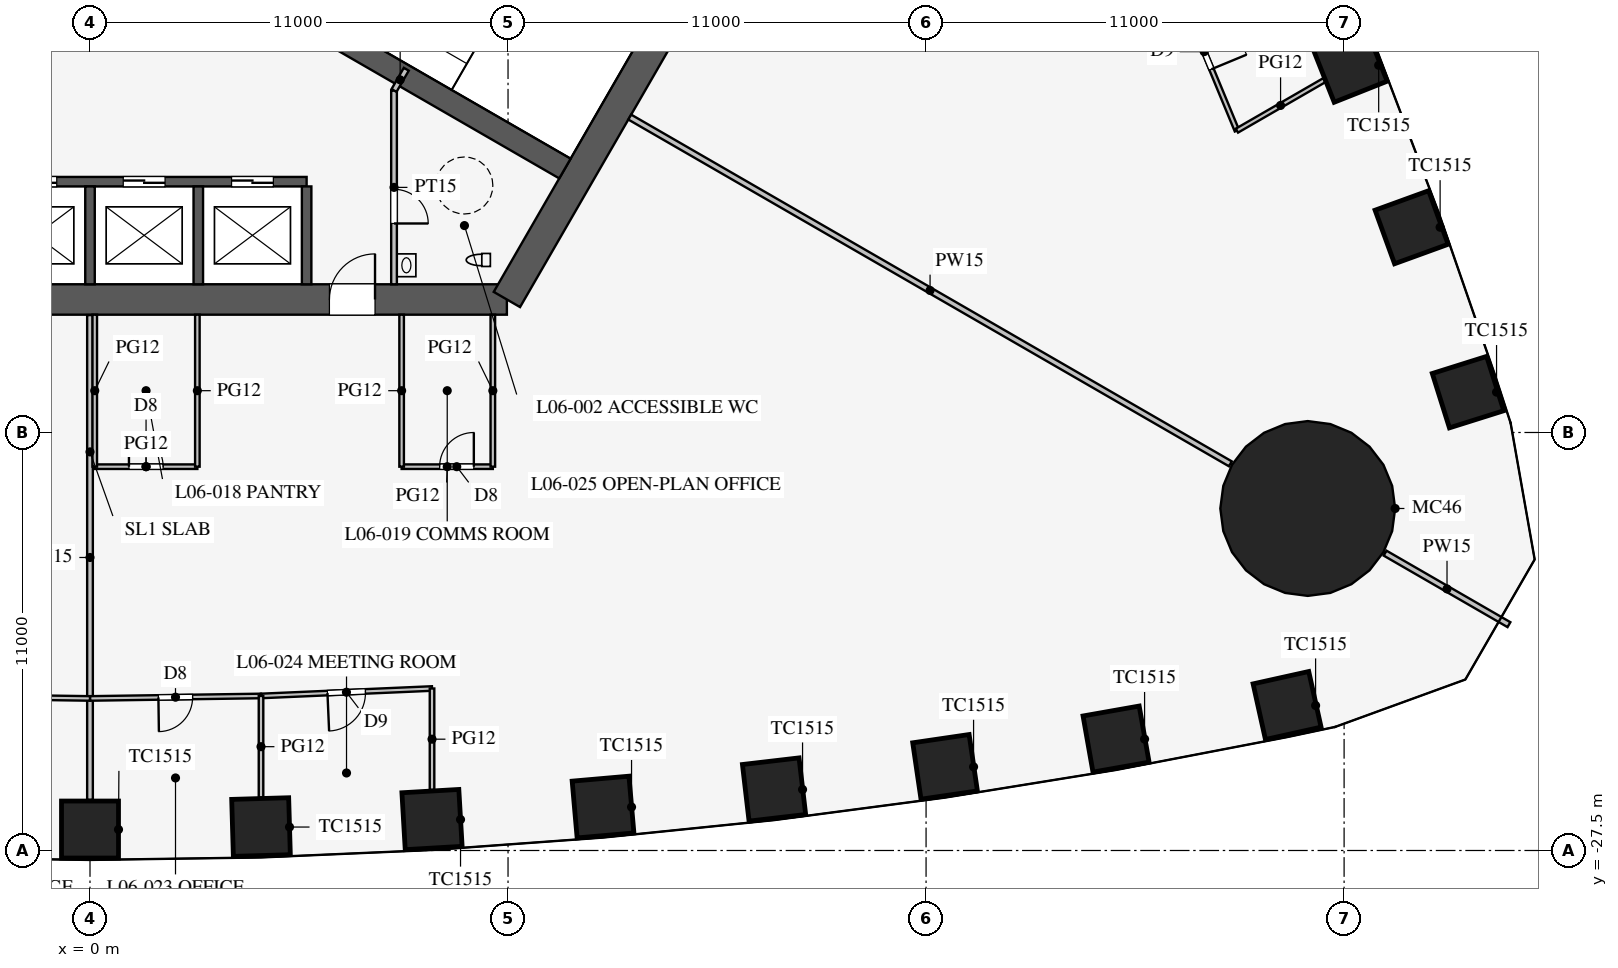
"""IFC4 building model, lengths in metres.
Left out: names, types, materials, properties, quantities, classifications, styles, units other than length and angle.
Written with IfcOpenShell. Run it as: python <this file> out.ifc"""

import sys

from ifc_helpers import new_model, si_unit, direction, frame, frame_2d, origin, origin_2d, place, context, subcontext, project, spatial, rectangle, circle, extrude, element, fill, save


model = new_model("IFC4")
c1 = context("Model", 3, precision=1e-05, world=origin(), true_north=direction((0.0, 1.0)))
c2 = subcontext(c1, "Body", "Model", "MODEL_VIEW")
j1 = project(units=[si_unit("LENGTHUNIT", "METRE"), si_unit("PLANEANGLEUNIT", "RADIAN")], contexts=[c1])
p1 = place(None, origin())
s1 = spatial("IfcSite", under=j1, at=p1, CompositionType="ELEMENT")
p2 = place(p1, origin())
s2 = spatial("IfcBuilding", under=s1, at=p2, CompositionType="ELEMENT")
p3 = place(p2, frame((0.0, 0.0, 29.1)))
s3 = spatial("IfcBuildingStorey", under=s2, at=p3, CompositionType="ELEMENT", Elevation=29.1)
for number, where, z_axis, x_axis in (
    (1, (0.0, -26.949, 0.0), (0.0, 0.0, 1.0), (1.0, 0.0, 0.0)),
    (2, (4.5, -26.883, 0.0), (0.0, 0.0, 1.0), (1.0, 0.029, 0.0)),
    (3, (9.0, -26.686, 0.0), (0.0, 0.0, 1.0), (0.998, 0.058, 0.0)),
    (4, (13.5, -26.357, 0.0), (0.0, 0.0, 1.0), (0.996, 0.087, 0.0)),
    (5, (18.0, -25.895, 0.0), (0.0, 0.0, 1.0), (0.993, 0.116, 0.0)),
    (6, (22.5, -25.299, 0.0), (0.0, 0.0, 1.0), (0.989, 0.145, 0.0)),
    (7, (27.0, -24.568, 0.0), (0.0, 0.0, 1.0), (0.985, 0.174, 0.0)),
    (8, (31.5, -23.685, 0.0), (0.0, 0.0, 1.0), (0.976, 0.217, 0.0)),
    (9, (36.262, -15.438, 0.0), (0.0, 0.0, 1.0), (-0.3, 0.954, 0.0)),
    (10, (34.776, -11.099, 0.0), (0.0, 0.0, 1.0), (-0.342, 0.94, 0.0)),
    (11, (33.16, -6.836, 0.0), (0.0, 0.0, 1.0), (-0.369, 0.929, 0.0)),
):
    element("IfcColumn", number, at=place(p3, frame(where, z_axis=z_axis, x_axis=x_axis)), inside=s3, PredefinedType="COLUMN", context=c2, shape_type="SweptSolid", body=[
        extrude(rectangle(XDim=1.5, YDim=1.5, at=origin_2d()), origin(), (0.0, 0.0, 1.0), 4.2),
    ])
p4 = place(p3, frame((32.043, -18.5, 0.0), z_axis=(0.0, 0.0, 1.0), x_axis=(1.0, 0.0, 0.0)))
e12 = element("IfcColumn", 12, at=p4, inside=s3, PredefinedType="COLUMN", context=c2, shape_type="SweptSolid", body=[
    extrude(circle(Radius=2.3, at=origin_2d()), origin(), (0.0, 0.0, 1.0), 4.2),
])
p5 = place(p3, frame((-10.97, -13.0, 0.0), z_axis=(0.0, 0.0, 1.0), x_axis=(1.0, 0.0, 0.0)))
e13 = element("IfcWall", 13, at=p5, inside=s3, PredefinedType="SHEAR", context=c2, shape_type="SweptSolid", body=[
    extrude(rectangle(XDim=21.939, YDim=0.8, at=frame_2d((10.97, 0.0))), origin(), (0.0, 0.0, 1.0), 4.2),
])
p6 = place(p5, frame((17.27, 0.0, 0.0)))
e14 = element("IfcOpeningElement", 14, at=p6, cuts=e13, PredefinedType="OPENING", context=c2, shape_type="SweptSolid", body=[
    extrude(rectangle(XDim=1.2, YDim=2.1, at=frame_2d((0.6, 1.05))), frame((0.0, 0.41, 0.0), z_axis=(0.0, -1.0, 0.0), x_axis=(1.0, 0.0, 0.0)), (0.0, 0.0, 1.0), 0.82),
])
p7 = place(p5, frame((3.47, 0.0, 0.0)))
e15 = element("IfcOpeningElement", 15, at=p7, cuts=e13, PredefinedType="OPENING", context=c2, shape_type="SweptSolid", body=[
    extrude(rectangle(XDim=1.2, YDim=2.1, at=frame_2d((0.6, 1.05))), frame((0.0, 0.41, 0.0), z_axis=(0.0, -1.0, 0.0), x_axis=(1.0, 0.0, 0.0)), (0.0, 0.0, 1.0), 0.82),
])
p8 = place(p3, frame((10.97, -13.0, 0.0), z_axis=(0.0, 0.0, 1.0), x_axis=(0.499995765644, 0.866027848477, 0.0)))
e16 = element("IfcWall", 16, at=p8, inside=s3, PredefinedType="SHEAR", context=c2, shape_type="SweptSolid", body=[
    extrude(rectangle(XDim=11.547, YDim=0.8, at=frame_2d((5.773, 0.0))), origin(), (0.0, 0.0, 1.0), 4.2),
])
p9 = place(p3, frame((-5.7, -9.9, 0.0), z_axis=(0.0, 0.0, 1.0), x_axis=(1.0, 0.0, 0.0)))
e17 = element("IfcWall", 17, at=p9, inside=s3, PredefinedType="SHEAR", context=c2, shape_type="SweptSolid", body=[
    extrude(rectangle(XDim=11.4, YDim=0.25, at=frame_2d((5.7, 0.0))), origin(), (0.0, 0.0, 1.0), 4.2),
])
p10 = place(p9, frame((0.875, 0.0, 0.0)))
e18 = element("IfcOpeningElement", 18, at=p10, cuts=e17, PredefinedType="OPENING", context=c2, shape_type="SweptSolid", body=[
    extrude(rectangle(XDim=1.1, YDim=2.2, at=frame_2d((0.55, 1.1))), frame((0.0, 0.135, 0.0), z_axis=(0.0, -1.0, 0.0), x_axis=(1.0, 0.0, 0.0)), (0.0, 0.0, 1.0), 0.27),
])
p11 = place(p9, frame((3.725, 0.0, 0.0)))
e19 = element("IfcOpeningElement", 19, at=p11, cuts=e17, PredefinedType="OPENING", context=c2, shape_type="SweptSolid", body=[
    extrude(rectangle(XDim=1.1, YDim=2.2, at=frame_2d((0.55, 1.1))), frame((0.0, 0.135, 0.0), z_axis=(0.0, -1.0, 0.0), x_axis=(1.0, 0.0, 0.0)), (0.0, 0.0, 1.0), 0.27),
])
p12 = place(p9, frame((6.575, 0.0, 0.0)))
e20 = element("IfcOpeningElement", 20, at=p12, cuts=e17, PredefinedType="OPENING", context=c2, shape_type="SweptSolid", body=[
    extrude(rectangle(XDim=1.1, YDim=2.2, at=frame_2d((0.55, 1.1))), frame((0.0, 0.135, 0.0), z_axis=(0.0, -1.0, 0.0), x_axis=(1.0, 0.0, 0.0)), (0.0, 0.0, 1.0), 0.27),
])
p13 = place(p9, frame((9.425, 0.0, 0.0)))
e21 = element("IfcOpeningElement", 21, at=p13, cuts=e17, PredefinedType="OPENING", context=c2, shape_type="SweptSolid", body=[
    extrude(rectangle(XDim=1.1, YDim=2.2, at=frame_2d((0.55, 1.1))), frame((0.0, 0.135, 0.0), z_axis=(0.0, -1.0, 0.0), x_axis=(1.0, 0.0, 0.0)), (0.0, 0.0, 1.0), 0.27),
])
for number, where, z_axis, x_axis in (
    (22, (0.0, -10.025, 0.0), (0.0, 0.0, 1.0), (0.0, -1.0, 0.0)),
    (23, (2.85, -10.025, 0.0), (0.0, 0.0, 1.0), (0.0, -1.0, 0.0)),
    (24, (5.7, -10.025, 0.0), (0.0, 0.0, 1.0), (0.0, -1.0, 0.0)),
):
    element("IfcWall", number, at=place(p3, frame(where, z_axis=z_axis, x_axis=x_axis)), inside=s3, PredefinedType="SHEAR", context=c2, shape_type="SweptSolid", body=[
        extrude(rectangle(XDim=2.575, YDim=0.25, at=frame_2d((1.288, 0.0))), origin(), (0.0, 0.0, 1.0), 4.2),
    ])
p14 = place(p3, frame((4.638, -5.016, 0.0), z_axis=(0.0, 0.0, 1.0), x_axis=(0.866019375473, -0.500010441196, 0.0)))
e25 = element("IfcWall", 25, at=p14, inside=s3, PredefinedType="SHEAR", context=c2, shape_type="SweptSolid", body=[
    extrude(rectangle(XDim=9.075, YDim=0.6, at=frame_2d((4.538, 0.0))), origin(), (0.0, 0.0, 1.0), 4.2),
])
p15 = place(p3, frame((8.0, -7.5, 0.0), z_axis=(0.0, 0.0, 1.0), x_axis=(0.0, -1.0, 0.0)))
e26 = element("IfcWall", 26, at=p15, inside=s3, PredefinedType="PARTITIONING", context=c2, shape_type="SweptSolid", body=[
    extrude(rectangle(XDim=5.1, YDim=0.15, at=frame_2d((2.55, 0.0))), origin(), (0.0, 0.0, 1.0), 4.0),
])
p16 = place(p15, frame((2.6, 0.0, 0.0)))
e27 = element("IfcOpeningElement", 27, at=p16, cuts=e26, PredefinedType="OPENING", context=c2, shape_type="SweptSolid", body=[
    extrude(rectangle(XDim=0.9, YDim=2.1, at=frame_2d((0.45, 1.05))), frame((0.0, 0.085, 0.0), z_axis=(0.0, -1.0, 0.0), x_axis=(1.0, 0.0, 0.0)), (0.0, 0.0, 1.0), 0.17),
])
p17 = place(p3, frame((8.0, -7.5, 0.0), z_axis=(0.0, 0.0, 1.0), x_axis=(0.499842556608, 0.866116284689, 0.0)))
e28 = element("IfcWall", 28, at=p17, inside=s3, PredefinedType="PARTITIONING", context=c2, shape_type="SweptSolid", body=[
    extrude(rectangle(XDim=0.645, YDim=0.15, at=frame_2d((0.323, 0.0))), origin(), (0.0, 0.0, 1.0), 4.0),
])
p18 = place(p3, frame((14.203, -8.2, 0.0), z_axis=(0.0, 0.0, 1.0), x_axis=(0.866024965723, -0.500000758745, 0.0)))
e29 = element("IfcWall", 29, at=p18, inside=s3, PredefinedType="PARTITIONING", context=c2, shape_type="SweptSolid", body=[
    extrude(rectangle(XDim=18.25, YDim=0.15, at=frame_2d((9.125, 0.0))), origin(), (0.0, 0.0, 1.0), 2.3),
])
p19 = place(p3, frame((34.078, -19.675, 0.0), z_axis=(0.0, 0.0, 1.0), x_axis=(0.866019247219, -0.500010663332, 0.0)))
e30 = element("IfcWall", 30, at=p19, inside=s3, PredefinedType="PARTITIONING", context=c2, shape_type="SweptSolid", body=[
    extrude(rectangle(XDim=3.764, YDim=0.15, at=frame_2d((1.882, 0.0))), origin(), (0.0, 0.0, 1.0), 2.3),
])
p20 = place(p3, frame((0.0, -13.41, 0.0), z_axis=(0.0, 0.0, 1.0), x_axis=(0.0, -1.0, 0.0)))
e31 = element("IfcWall", 31, at=p20, inside=s3, PredefinedType="PARTITIONING", context=c2, shape_type="SweptSolid", body=[
    extrude(rectangle(XDim=12.759, YDim=0.15, at=frame_2d((6.379, 0.0))), origin(), (0.0, 0.0, 1.0), 3.2),
])
p21 = place(p3, frame((0.125, -17.4, 0.0), z_axis=(0.0, 0.0, 1.0), x_axis=(1.0, 0.0, 0.0)))
e32 = element("IfcWall", 32, at=p21, inside=s3, PredefinedType="PARTITIONING", context=c2, shape_type="SweptSolid", body=[
    extrude(rectangle(XDim=2.7, YDim=0.12, at=frame_2d((1.35, 0.0))), origin(), (0.0, 0.0, 1.0), 2.9),
])
p22 = place(p21, frame((0.9, 0.0, 0.15)))
e33 = element("IfcOpeningElement", 33, at=p22, cuts=e32, PredefinedType="OPENING", context=c2, shape_type="SweptSolid", body=[
    extrude(rectangle(XDim=0.9, YDim=2.1, at=frame_2d((0.45, 1.05))), frame((0.0, 0.07, 0.0), z_axis=(0.0, -1.0, 0.0), x_axis=(1.0, 0.0, 0.0)), (0.0, 0.0, 1.0), 0.14),
])
p23 = place(p3, frame((8.2, -17.4, 0.0), z_axis=(0.0, 0.0, 1.0), x_axis=(1.0, 0.0, 0.0)))
e34 = element("IfcWall", 34, at=p23, inside=s3, PredefinedType="PARTITIONING", context=c2, shape_type="SweptSolid", body=[
    extrude(rectangle(XDim=2.4, YDim=0.12, at=frame_2d((1.2, 0.0))), origin(), (0.0, 0.0, 1.0), 2.9),
])
p24 = place(p23, frame((1.0, 0.0, 0.15)))
e35 = element("IfcOpeningElement", 35, at=p24, cuts=e34, PredefinedType="OPENING", context=c2, shape_type="SweptSolid", body=[
    extrude(rectangle(XDim=0.9, YDim=2.1, at=frame_2d((0.45, 1.05))), frame((0.0, 0.07, 0.0), z_axis=(0.0, -1.0, 0.0), x_axis=(1.0, 0.0, 0.0)), (0.0, 0.0, 1.0), 0.14),
])
for number, where, z_axis, x_axis in (
    (36, (0.125, -13.4, 0.0), (0.0, 0.0, 1.0), (0.0, -1.0, 0.0)),
    (37, (10.6, -13.4, 0.0), (0.0, 0.0, 1.0), (0.0, -1.0, 0.0)),
    (38, (2.825, -13.4, 0.0), (0.0, 0.0, 1.0), (0.0, -1.0, 0.0)),
    (39, (8.2, -13.4, 0.0), (0.0, 0.0, 1.0), (0.0, -1.0, 0.0)),
):
    element("IfcWall", number, at=place(p3, frame(where, z_axis=z_axis, x_axis=x_axis)), inside=s3, PredefinedType="PARTITIONING", context=c2, shape_type="SweptSolid", body=[
        extrude(rectangle(XDim=4.0, YDim=0.12, at=frame_2d((2.0, 0.0))), origin(), (0.0, 0.0, 1.0), 2.9),
    ])
p25 = place(p3, frame((0.0, -23.499, 0.0), z_axis=(0.0, 0.0, 1.0), x_axis=(0.999894311967, 0.014538393859, 0.0)))
e40 = element("IfcWall", 40, at=p25, inside=s3, PredefinedType="PARTITIONING", context=c2, shape_type="SweptSolid", body=[
    extrude(rectangle(XDim=4.5, YDim=0.12, at=frame_2d((2.25, 0.0))), origin(), (0.0, 0.0, 1.0), 2.9),
])
p26 = place(p25, frame((1.8, 0.0, 0.15)))
e41 = element("IfcOpeningElement", 41, at=p26, cuts=e40, PredefinedType="OPENING", context=c2, shape_type="SweptSolid", body=[
    extrude(rectangle(XDim=0.9, YDim=2.1, at=frame_2d((0.45, 1.05))), frame((0.0, 0.07, 0.0), z_axis=(0.0, -1.0, 0.0), x_axis=(1.0, 0.0, 0.0)), (0.0, 0.0, 1.0), 0.14),
])
p27 = place(p3, frame((4.5, -23.433, 0.0), z_axis=(0.0, 0.0, 1.0), x_axis=(0.999052370647, 0.043524254212, 0.0)))
e42 = element("IfcWall", 42, at=p27, inside=s3, PredefinedType="PARTITIONING", context=c2, shape_type="SweptSolid", body=[
    extrude(rectangle(XDim=4.504, YDim=0.12, at=frame_2d((2.252, 0.0))), origin(), (0.0, 0.0, 1.0), 2.9),
])
p28 = place(p27, frame((1.75, 0.0, 0.15)))
e43 = element("IfcOpeningElement", 43, at=p28, cuts=e42, PredefinedType="OPENING", context=c2, shape_type="SweptSolid", body=[
    extrude(rectangle(XDim=1.0, YDim=2.1, at=frame_2d((0.5, 1.05))), frame((0.0, 0.07, 0.0), z_axis=(0.0, -1.0, 0.0), x_axis=(1.0, 0.0, 0.0)), (0.0, 0.0, 1.0), 0.14),
])
p29 = place(p3, frame((-4.5, -23.433, 0.0), z_axis=(0.0, 0.0, 1.0), x_axis=(0.999894311967, -0.014538393859, 0.0)))
e44 = element("IfcWall", 44, at=p29, inside=s3, PredefinedType="PARTITIONING", context=c2, shape_type="SweptSolid", body=[
    extrude(rectangle(XDim=4.5, YDim=0.12, at=frame_2d((2.25, 0.0))), origin(), (0.0, 0.0, 1.0), 2.9),
])
p30 = place(p29, frame((1.8, 0.0, 0.15)))
e45 = element("IfcOpeningElement", 45, at=p30, cuts=e44, PredefinedType="OPENING", context=c2, shape_type="SweptSolid", body=[
    extrude(rectangle(XDim=0.9, YDim=2.1, at=frame_2d((0.45, 1.05))), frame((0.0, 0.07, 0.0), z_axis=(0.0, -1.0, 0.0), x_axis=(1.0, 0.0, 0.0)), (0.0, 0.0, 1.0), 0.14),
])
p31 = place(p3, frame((4.5, -23.433, 0.0), z_axis=(0.0, 0.0, 1.0), x_axis=(0.0, -1.0, 0.0)))
e46 = element("IfcWall", 46, at=p31, inside=s3, PredefinedType="PARTITIONING", context=c2, shape_type="SweptSolid", body=[
    extrude(rectangle(XDim=2.669, YDim=0.12, at=frame_2d((1.335, 0.0))), origin(), (0.0, 0.0, 1.0), 2.9),
])
p32 = place(p3, frame((9.0, -23.237, 0.0), z_axis=(0.0, 0.0, 1.0), x_axis=(0.0, -1.0, 0.0)))
e47 = element("IfcWall", 47, at=p32, inside=s3, PredefinedType="PARTITIONING", context=c2, shape_type="SweptSolid", body=[
    extrude(rectangle(XDim=2.667, YDim=0.12, at=frame_2d((1.334, 0.0))), origin(), (0.0, 0.0, 1.0), 2.9),
])
p33 = place(p3, frame((30.179, -8.557, 0.0), z_axis=(0.0, 0.0, 1.0), x_axis=(-0.382594071331, 0.923916542001, 0.0)))
e48 = element("IfcWall", 48, at=p33, inside=s3, PredefinedType="PARTITIONING", context=c2, shape_type="SweptSolid", body=[
    extrude(rectangle(XDim=4.539, YDim=0.12, at=frame_2d((2.27, 0.0))), origin(), (0.0, 0.0, 1.0), 2.9),
])
p34 = place(p33, frame((1.75, 0.0, 0.15)))
e49 = element("IfcOpeningElement", 49, at=p34, cuts=e48, PredefinedType="OPENING", context=c2, shape_type="SweptSolid", body=[
    extrude(rectangle(XDim=1.0, YDim=2.1, at=frame_2d((0.5, 1.05))), frame((0.0, 0.07, 0.0), z_axis=(0.0, -1.0, 0.0), x_axis=(1.0, 0.0, 0.0)), (0.0, 0.0, 1.0), 0.14),
])
p35 = place(p3, frame((30.179, -8.557, 0.0), z_axis=(0.0, 0.0, 1.0), x_axis=(0.866026229868, 0.499998569178, 0.0)))
e50 = element("IfcWall", 50, at=p35, inside=s3, PredefinedType="PARTITIONING", context=c2, shape_type="SweptSolid", body=[
    extrude(rectangle(XDim=2.653, YDim=0.12, at=frame_2d((1.327, 0.0))), origin(), (0.0, 0.0, 1.0), 2.9),
])
p36 = place(p16, origin())
e51 = element("IfcDoor", 51, at=p36, inside=s3, OperationType="SINGLE_SWING_RIGHT", PredefinedType="DOOR", context=c2, shape_type="SweptSolid", body=[
    extrude(rectangle(XDim=0.9, YDim=2.1, at=frame_2d((0.45, 1.05))), frame((0.0, 0.025, 0.0), z_axis=(0.0, -1.0, 0.0), x_axis=(1.0, 0.0, 0.0)), (0.0, 0.0, 1.0), 0.05),
])
fill(e27, e51)
p37 = place(p6, origin())
e52 = element("IfcDoor", 52, at=p37, inside=s3, OperationType="SINGLE_SWING_RIGHT", PredefinedType="DOOR", context=c2, shape_type="SweptSolid", body=[
    extrude(rectangle(XDim=1.2, YDim=2.1, at=frame_2d((0.6, 1.05))), frame((0.0, 0.025, 0.0), z_axis=(0.0, -1.0, 0.0), x_axis=(1.0, 0.0, 0.0)), (0.0, 0.0, 1.0), 0.05),
])
fill(e14, e52)
p38 = place(p22, origin())
e53 = element("IfcDoor", 53, at=p38, inside=s3, OperationType="SINGLE_SWING_LEFT", PredefinedType="DOOR", context=c2, shape_type="SweptSolid", body=[
    extrude(rectangle(XDim=0.9, YDim=2.1, at=frame_2d((0.45, 1.05))), frame((0.0, 0.025, 0.0), z_axis=(0.0, -1.0, 0.0), x_axis=(1.0, 0.0, 0.0)), (0.0, 0.0, 1.0), 0.05),
])
fill(e33, e53)
p39 = place(p24, origin())
e54 = element("IfcDoor", 54, at=p39, inside=s3, OperationType="SINGLE_SWING_RIGHT", PredefinedType="DOOR", context=c2, shape_type="SweptSolid", body=[
    extrude(rectangle(XDim=0.9, YDim=2.1, at=frame_2d((0.45, 1.05))), frame((0.0, 0.025, 0.0), z_axis=(0.0, -1.0, 0.0), x_axis=(1.0, 0.0, 0.0)), (0.0, 0.0, 1.0), 0.05),
])
fill(e35, e54)
p40 = place(p26, frame((0.9, 0.0, 0.0), z_axis=(0.0, 0.0, 1.0), x_axis=(-1.0, 0.0, 0.0)))
e55 = element("IfcDoor", 55, at=p40, inside=s3, OperationType="SINGLE_SWING_RIGHT", PredefinedType="DOOR", context=c2, shape_type="SweptSolid", body=[
    extrude(rectangle(XDim=0.9, YDim=2.1, at=frame_2d((0.45, 1.05))), frame((0.0, 0.025, 0.0), z_axis=(0.0, -1.0, 0.0), x_axis=(1.0, 0.0, 0.0)), (0.0, 0.0, 1.0), 0.05),
])
fill(e41, e55)
p41 = place(p28, frame((1.0, 0.0, 0.0), z_axis=(0.0, 0.0, 1.0), x_axis=(-1.0, 0.0, 0.0)))
e56 = element("IfcDoor", 56, at=p41, inside=s3, OperationType="SINGLE_SWING_RIGHT", PredefinedType="DOOR", context=c2, shape_type="SweptSolid", body=[
    extrude(rectangle(XDim=1.0, YDim=2.1, at=frame_2d((0.5, 1.05))), frame((0.0, 0.025, 0.0), z_axis=(0.0, -1.0, 0.0), x_axis=(1.0, 0.0, 0.0)), (0.0, 0.0, 1.0), 0.05),
])
fill(e43, e56)
p42 = place(p34, frame((1.0, 0.0, 0.0), z_axis=(0.0, 0.0, 1.0), x_axis=(-1.0, 0.0, 0.0)))
e57 = element("IfcDoor", 57, at=p42, inside=s3, OperationType="SINGLE_SWING_RIGHT", PredefinedType="DOOR", context=c2, shape_type="SweptSolid", body=[
    extrude(rectangle(XDim=1.0, YDim=2.1, at=frame_2d((0.5, 1.05))), frame((0.0, 0.025, 0.0), z_axis=(0.0, -1.0, 0.0), x_axis=(1.0, 0.0, 0.0)), (0.0, 0.0, 1.0), 0.05),
])
fill(e49, e57)
p43 = place(p11, origin())
e58 = element("IfcDoor", 58, at=p43, inside=s3, OperationType="DOUBLE_DOOR_SLIDING", PredefinedType="DOOR", context=c2, shape_type="SweptSolid", body=[
    extrude(rectangle(XDim=1.1, YDim=2.2, at=frame_2d((0.55, 1.1))), frame((0.0, 0.025, 0.0), z_axis=(0.0, -1.0, 0.0), x_axis=(1.0, 0.0, 0.0)), (0.0, 0.0, 1.0), 0.05),
])
fill(e19, e58)
p44 = place(p12, origin())
e59 = element("IfcDoor", 59, at=p44, inside=s3, OperationType="DOUBLE_DOOR_SLIDING", PredefinedType="DOOR", context=c2, shape_type="SweptSolid", body=[
    extrude(rectangle(XDim=1.1, YDim=2.2, at=frame_2d((0.55, 1.1))), frame((0.0, 0.025, 0.0), z_axis=(0.0, -1.0, 0.0), x_axis=(1.0, 0.0, 0.0)), (0.0, 0.0, 1.0), 0.05),
])
fill(e20, e59)
p45 = place(p13, origin())
e60 = element("IfcDoor", 60, at=p45, inside=s3, OperationType="DOUBLE_DOOR_SLIDING", PredefinedType="DOOR", context=c2, shape_type="SweptSolid", body=[
    extrude(rectangle(XDim=1.1, YDim=2.2, at=frame_2d((0.55, 1.1))), frame((0.0, 0.025, 0.0), z_axis=(0.0, -1.0, 0.0), x_axis=(1.0, 0.0, 0.0)), (0.0, 0.0, 1.0), 0.05),
])
fill(e21, e60)
save(model, sys.argv[1])
